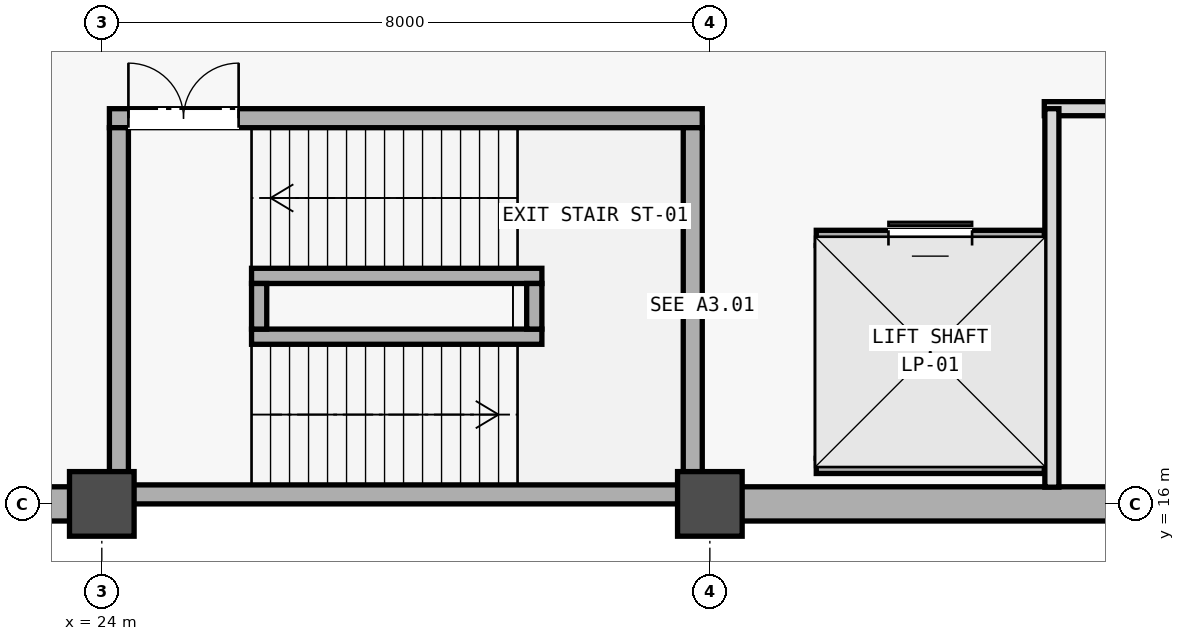
"""IFC4 building model, lengths in metres.
Left out: names, types, materials, properties, quantities, classifications, styles, units other than length and angle.
Written with IfcOpenShell. Run it as: python <this file> out.ifc"""

import sys

from ifc_helpers import new_model, si_unit, direction, frame, frame_2d, origin, origin_2d, place, context, subcontext, project, spatial, rectangle, extrude, element, fill, save


model = new_model("IFC4")
c1 = context("Model", 3, precision=1e-05, world=origin(), true_north=direction((0.0, 1.0)))
c2 = subcontext(c1, "Body", "Model", "MODEL_VIEW")
j1 = project(units=[si_unit("LENGTHUNIT", "METRE"), si_unit("PLANEANGLEUNIT", "RADIAN")], contexts=[c1])
p1 = place(None, origin())
s1 = spatial("IfcSite", under=j1, at=p1, CompositionType="ELEMENT")
p2 = place(p1, origin())
s2 = spatial("IfcBuilding", under=s1, at=p2, CompositionType="ELEMENT")
p3 = place(p2, frame((0.0, 0.0, -4.8)))
s3 = spatial("IfcBuildingStorey", under=s2, at=p3, CompositionType="ELEMENT", Elevation=-4.8)
for number, where, z_axis, x_axis in (
    (1, (24.0, 16.0, 0.0), (0.0, 0.0, 1.0), (1.0, 0.0, 0.0)),
    (2, (32.0, 16.0, 0.0), (0.0, 0.0, 1.0), (1.0, 0.0, 0.0)),
):
    element("IfcColumn", number, at=place(p3, frame(where, z_axis=z_axis, x_axis=x_axis)), inside=s3, PredefinedType="COLUMN", context=c2, shape_type="SweptSolid", body=[
        extrude(rectangle(XDim=0.85, YDim=0.85, at=origin_2d()), origin(), (0.0, 0.0, 1.0), 4.47),
    ])
p4 = place(p3, frame((16.0, 16.0, 0.0), z_axis=(0.0, 0.0, 1.0), x_axis=(1.0, 0.0, 0.0)))
e3 = element("IfcWall", 3, at=p4, inside=s3, PredefinedType="SOLIDWALL", context=c2, shape_type="SweptSolid", body=[
    extrude(rectangle(XDim=8.098, YDim=0.45, at=frame_2d((4.049, 0.0))), origin(), (0.0, 0.0, 1.0), 4.47),
])
p5 = place(p3, frame((31.902, 16.0, 0.0), z_axis=(0.0, 0.0, 1.0), x_axis=(1.0, 0.0, 0.0)))
e4 = element("IfcWall", 4, at=p5, inside=s3, PredefinedType="SOLIDWALL", context=c2, shape_type="SweptSolid", body=[
    extrude(rectangle(XDim=40.196, YDim=0.45, at=frame_2d((20.098, 0.0))), origin(), (0.0, 0.0, 1.0), 4.47),
])
p6 = place(p3, frame((24.1, 16.125, 0.0), z_axis=(0.0, 0.0, 1.0), x_axis=(1.0, 0.0, 0.0)))
e5 = element("IfcWall", 5, at=p6, inside=s3, PredefinedType="SHEAR", context=c2, shape_type="SweptSolid", body=[
    extrude(rectangle(XDim=7.8, YDim=0.25, at=frame_2d((3.9, 0.0))), origin(), (0.0, 0.0, 1.0), 4.8),
])
p7 = place(p3, frame((24.1, 21.075, 0.0), z_axis=(0.0, 0.0, 1.0), x_axis=(1.0, 0.0, 0.0)))
e6 = element("IfcWall", 6, at=p7, inside=s3, PredefinedType="SHEAR", context=c2, shape_type="SweptSolid", body=[
    extrude(rectangle(XDim=7.8, YDim=0.25, at=frame_2d((3.9, 0.0))), origin(), (0.0, 0.0, 1.0), 4.8),
])
p8 = place(p7, frame((0.25, 0.0, 0.0)))
e7 = element("IfcOpeningElement", 7, at=p8, cuts=e6, PredefinedType="OPENING", context=c2, shape_type="SweptSolid", body=[
    extrude(rectangle(XDim=1.45, YDim=2.2, at=frame_2d((0.725, 1.1))), frame((0.0, 0.135, 0.0), z_axis=(0.0, -1.0, 0.0), x_axis=(1.0, 0.0, 0.0)), (0.0, 0.0, 1.0), 0.27),
])
for number, where, z_axis, x_axis in (
    (8, (24.225, 16.25, 0.0), (0.0, 0.0, 1.0), (0.0, 1.0, 0.0)),
    (9, (31.775, 16.25, 0.0), (0.0, 0.0, 1.0), (0.0, 1.0, 0.0)),
):
    element("IfcWall", number, at=place(p3, frame(where, z_axis=z_axis, x_axis=x_axis)), inside=s3, PredefinedType="SHEAR", context=c2, shape_type="SweptSolid", body=[
        extrude(rectangle(XDim=4.7, YDim=0.25, at=frame_2d((2.35, 0.0))), origin(), (0.0, 0.0, 1.0), 4.8),
    ])
for number, where, z_axis, x_axis in (
    (10, (25.97, 18.2, 0.0), (0.0, 0.0, 1.0), (1.0, 0.0, 0.0)),
    (11, (25.97, 19.0, 0.0), (0.0, 0.0, 1.0), (1.0, 0.0, 0.0)),
):
    element("IfcWall", number, at=place(p3, frame(where, z_axis=z_axis, x_axis=x_axis)), inside=s3, PredefinedType="SHEAR", context=c2, shape_type="SweptSolid", body=[
        extrude(rectangle(XDim=3.82, YDim=0.2, at=frame_2d((1.91, 0.0))), origin(), (0.0, 0.0, 1.0), 4.8),
    ])
for number, where, z_axis, x_axis in (
    (12, (26.07, 18.3, 0.0), (0.0, 0.0, 1.0), (0.0, 1.0, 0.0)),
    (13, (29.69, 18.3, 0.0), (0.0, 0.0, 1.0), (0.0, 1.0, 0.0)),
):
    element("IfcWall", number, at=place(p3, frame(where, z_axis=z_axis, x_axis=x_axis)), inside=s3, PredefinedType="SHEAR", context=c2, shape_type="SweptSolid", body=[
        extrude(rectangle(XDim=0.6, YDim=0.2, at=frame_2d((0.3, 0.0))), origin(), (0.0, 0.0, 1.0), 4.8),
    ])
p9 = place(p3, frame((33.4, 16.5, 0.0), z_axis=(0.0, 0.0, 1.0), x_axis=(1.0, 0.0, 0.0)))
e14 = element("IfcWall", 14, at=p9, inside=s3, PredefinedType="SHEAR", context=c2, shape_type="SweptSolid", body=[
    extrude(rectangle(XDim=3.0, YDim=0.2, at=frame_2d((1.5, 0.0))), origin(), (0.0, 0.0, 1.0), 4.8),
])
p10 = place(p3, frame((33.4, 19.5, 0.0), z_axis=(0.0, 0.0, 1.0), x_axis=(1.0, 0.0, 0.0)))
e15 = element("IfcWall", 15, at=p10, inside=s3, PredefinedType="SHEAR", context=c2, shape_type="SweptSolid", body=[
    extrude(rectangle(XDim=3.0, YDim=0.2, at=frame_2d((1.5, 0.0))), origin(), (0.0, 0.0, 1.0), 4.8),
])
p11 = place(p10, frame((0.95, 0.0, 0.0)))
e16 = element("IfcOpeningElement", 16, at=p11, cuts=e15, PredefinedType="OPENING", context=c2, shape_type="SweptSolid", body=[
    extrude(rectangle(XDim=1.1, YDim=2.2, at=frame_2d((0.55, 1.1))), frame((0.0, 0.11, 0.0), z_axis=(0.0, -1.0, 0.0), x_axis=(1.0, 0.0, 0.0)), (0.0, 0.0, 1.0), 0.22),
])
for number, where, z_axis, x_axis in (
    (17, (33.5, 16.6, 0.0), (0.0, 0.0, 1.0), (0.0, 1.0, 0.0)),
    (18, (36.3, 16.6, 0.0), (0.0, 0.0, 1.0), (0.0, 1.0, 0.0)),
):
    element("IfcWall", number, at=place(p3, frame(where, z_axis=z_axis, x_axis=x_axis)), inside=s3, PredefinedType="SHEAR", context=c2, shape_type="SweptSolid", body=[
        extrude(rectangle(XDim=2.8, YDim=0.2, at=frame_2d((1.4, 0.0))), origin(), (0.0, 0.0, 1.0), 4.8),
    ])
p12 = place(p3, frame((36.4, 21.2, 0.0), z_axis=(0.0, 0.0, 1.0), x_axis=(1.0, 0.0, 0.0)))
e19 = element("IfcWall", 19, at=p12, inside=s3, PredefinedType="STANDARD", context=c2, shape_type="SweptSolid", body=[
    extrude(rectangle(XDim=31.2, YDim=0.185, at=frame_2d((15.6, 0.0))), origin(), (0.0, 0.0, 1.0), 3.75),
])
p13 = place(p12, frame((14.4, 0.0, 0.0)))
e20 = element("IfcOpeningElement", 20, at=p13, cuts=e19, PredefinedType="OPENING", context=c2, shape_type="SweptSolid", body=[
    extrude(rectangle(XDim=1.6, YDim=2.3, at=frame_2d((0.8, 1.15))), frame((0.0, 0.103, 0.0), z_axis=(0.0, -1.0, 0.0), x_axis=(1.0, 0.0, 0.0)), (0.0, 0.0, 1.0), 0.205),
])
p14 = place(p3, frame((36.5, 16.22, 0.0), z_axis=(0.0, 0.0, 1.0), x_axis=(0.0, 1.0, 0.0)))
e21 = element("IfcWall", 21, at=p14, inside=s3, PredefinedType="STANDARD", context=c2, shape_type="SweptSolid", body=[
    extrude(rectangle(XDim=4.98, YDim=0.185, at=frame_2d((2.49, 0.0))), origin(), (0.0, 0.0, 1.0), 3.65),
])
p15 = place(p8, origin())
e22 = element("IfcDoor", 22, at=p15, inside=s3, OperationType="DOUBLE_DOOR_SINGLE_SWING", PredefinedType="DOOR", context=c2, shape_type="SweptSolid", body=[
    extrude(rectangle(XDim=1.45, YDim=2.2, at=frame_2d((0.725, 1.1))), frame((0.0, 0.025, 0.0), z_axis=(0.0, -1.0, 0.0), x_axis=(1.0, 0.0, 0.0)), (0.0, 0.0, 1.0), 0.05),
])
fill(e7, e22)
p16 = place(p11, origin())
e23 = element("IfcDoor", 23, at=p16, inside=s3, OperationType="SLIDING_TO_LEFT", PredefinedType="DOOR", context=c2, shape_type="SweptSolid", body=[
    extrude(rectangle(XDim=1.1, YDim=2.2, at=frame_2d((0.55, 1.1))), frame((0.0, 0.025, 0.0), z_axis=(0.0, -1.0, 0.0), x_axis=(1.0, 0.0, 0.0)), (0.0, 0.0, 1.0), 0.05),
])
fill(e16, e23)
save(model, sys.argv[1])
